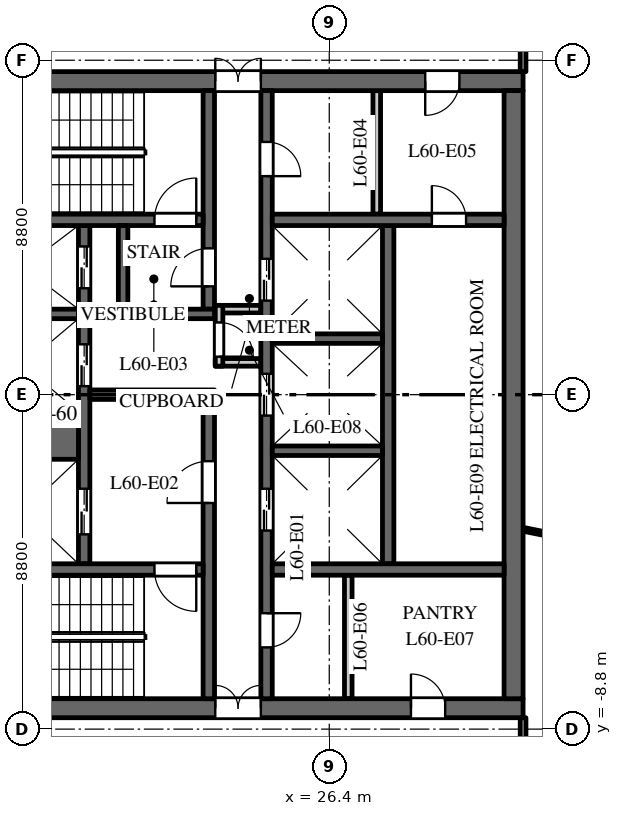
"""IFC4 building model, lengths in metres.
Left out: names, types, materials, properties, quantities, classifications, styles, units other than length and angle.
Written with IfcOpenShell. Run it as: python <this file> out.ifc"""

import sys

from ifc_helpers import new_model, si_unit, direction, frame, frame_2d, origin, place, context, subcontext, project, spatial, rectangle, extrude, element, fill, save


model = new_model("IFC4")
c1 = context("Model", 3, precision=1e-05, world=origin(), true_north=direction((0.0, 1.0)))
c2 = subcontext(c1, "Body", "Model", "MODEL_VIEW")
j1 = project(units=[si_unit("LENGTHUNIT", "METRE"), si_unit("PLANEANGLEUNIT", "RADIAN")], contexts=[c1])
p1 = place(None, origin())
s1 = spatial("IfcSite", under=j1, at=p1, CompositionType="ELEMENT")
p2 = place(p1, origin())
s2 = spatial("IfcBuilding", under=s1, at=p2, CompositionType="ELEMENT")
p3 = place(p2, frame((0.0, 0.0, 281.5)))
s3 = spatial("IfcBuildingStorey", under=s2, at=p3, CompositionType="ELEMENT", Elevation=281.5)
p4 = place(p3, frame((16.5, 8.25, 0.0), z_axis=(0.0, 0.0, 1.0), x_axis=(1.0, 0.0, 0.0)))
e1 = element("IfcWall", 1, at=p4, inside=s3, PredefinedType="SHEAR", context=c2, shape_type="SweptSolid", body=[
    extrude(rectangle(XDim=15.0, YDim=0.5, at=frame_2d((7.5, 0.0))), origin(), (0.0, 0.0, 1.0), 3.7),
])
p5 = place(p4, frame((6.9, 0.0, 0.0)))
e2 = element("IfcOpeningElement", 2, at=p5, cuts=e1, PredefinedType="OPENING", context=c2, shape_type="SweptSolid", body=[
    extrude(rectangle(XDim=1.2, YDim=2.1, at=frame_2d((0.6, 1.05))), frame((0.0, 0.26, 0.0), z_axis=(0.0, -1.0, 0.0), x_axis=(1.0, 0.0, 0.0)), (0.0, 0.0, 1.0), 0.52),
])
p6 = place(p4, frame((12.425, 0.0, 0.0)))
e3 = element("IfcOpeningElement", 3, at=p6, cuts=e1, PredefinedType="OPENING", context=c2, shape_type="SweptSolid", body=[
    extrude(rectangle(XDim=0.9, YDim=2.1, at=frame_2d((0.45, 1.05))), frame((0.0, 0.26, 0.0), z_axis=(0.0, -1.0, 0.0), x_axis=(1.0, 0.0, 0.0)), (0.0, 0.0, 1.0), 0.52),
])
p7 = place(p3, frame((16.5, -8.25, 0.0), z_axis=(0.0, 0.0, 1.0), x_axis=(1.0, 0.0, 0.0)))
e4 = element("IfcWall", 4, at=p7, inside=s3, PredefinedType="SHEAR", context=c2, shape_type="SweptSolid", body=[
    extrude(rectangle(XDim=15.0, YDim=0.5, at=frame_2d((7.5, 0.0))), origin(), (0.0, 0.0, 1.0), 3.7),
])
p8 = place(p7, frame((6.9, 0.0, 0.0)))
e5 = element("IfcOpeningElement", 5, at=p8, cuts=e4, PredefinedType="OPENING", context=c2, shape_type="SweptSolid", body=[
    extrude(rectangle(XDim=1.2, YDim=2.1, at=frame_2d((0.6, 1.05))), frame((0.0, 0.26, 0.0), z_axis=(0.0, -1.0, 0.0), x_axis=(1.0, 0.0, 0.0)), (0.0, 0.0, 1.0), 0.52),
])
p9 = place(p7, frame((12.05, 0.0, 0.0)))
e6 = element("IfcOpeningElement", 6, at=p9, cuts=e4, PredefinedType="OPENING", context=c2, shape_type="SweptSolid", body=[
    extrude(rectangle(XDim=0.9, YDim=2.1, at=frame_2d((0.45, 1.05))), frame((0.0, 0.26, 0.0), z_axis=(0.0, -1.0, 0.0), x_axis=(1.0, 0.0, 0.0)), (0.0, 0.0, 1.0), 0.52),
])
p10 = place(p3, frame((27.95, -4.45, 0.0), z_axis=(0.0, 0.0, 1.0), x_axis=(0.0, 1.0, 0.0)))
e7 = element("IfcWall", 7, at=p10, inside=s3, PredefinedType="SHEAR", context=c2, shape_type="SweptSolid", body=[
    extrude(rectangle(XDim=8.9, YDim=0.3, at=frame_2d((4.45, 0.0))), origin(), (0.0, 0.0, 1.0), 3.7),
])
p11 = place(p3, frame((19.95, -4.45, 0.0), z_axis=(0.0, 0.0, 1.0), x_axis=(0.0, 1.0, 0.0)))
e8 = element("IfcWall", 8, at=p11, inside=s3, PredefinedType="SHEAR", context=c2, shape_type="SweptSolid", body=[
    extrude(rectangle(XDim=8.9, YDim=0.3, at=frame_2d((4.45, 0.0))), origin(), (0.0, 0.0, 1.0), 3.7),
])
p12 = place(p11, frame((0.775, 0.0, 0.0)))
e9 = element("IfcOpeningElement", 9, at=p12, cuts=e8, PredefinedType="OPENING", context=c2, shape_type="SweptSolid", body=[
    extrude(rectangle(XDim=1.2, YDim=2.1, at=frame_2d((0.6, 1.05))), frame((0.0, 0.16, 0.0), z_axis=(0.0, -1.0, 0.0), x_axis=(1.0, 0.0, 0.0)), (0.0, 0.0, 1.0), 0.32),
])
p13 = place(p11, frame((4.675, 0.0, 0.0)))
e10 = element("IfcOpeningElement", 10, at=p13, cuts=e8, PredefinedType="OPENING", context=c2, shape_type="SweptSolid", body=[
    extrude(rectangle(XDim=1.1, YDim=2.1, at=frame_2d((0.55, 1.05))), frame((0.0, 0.16, 0.0), z_axis=(0.0, -1.0, 0.0), x_axis=(1.0, 0.0, 0.0)), (0.0, 0.0, 1.0), 0.32),
])
p14 = place(p11, frame((7.25, 0.0, 0.0)))
e11 = element("IfcOpeningElement", 11, at=p14, cuts=e8, PredefinedType="OPENING", context=c2, shape_type="SweptSolid", body=[
    extrude(rectangle(XDim=1.1, YDim=2.1, at=frame_2d((0.55, 1.05))), frame((0.0, 0.16, 0.0), z_axis=(0.0, -1.0, 0.0), x_axis=(1.0, 0.0, 0.0)), (0.0, 0.0, 1.0), 0.32),
])
p15 = place(p3, frame((24.75, -8.0, 0.0), z_axis=(0.0, 0.0, 1.0), x_axis=(0.0, 1.0, 0.0)))
e12 = element("IfcWall", 12, at=p15, inside=s3, PredefinedType="SHEAR", context=c2, shape_type="SweptSolid", body=[
    extrude(rectangle(XDim=16.0, YDim=0.3, at=frame_2d((8.0, 0.0))), origin(), (0.0, 0.0, 1.0), 3.7),
])
p16 = place(p15, frame((4.425, 0.0, 0.0)))
e13 = element("IfcOpeningElement", 13, at=p16, cuts=e12, PredefinedType="OPENING", context=c2, shape_type="SweptSolid", body=[
    extrude(rectangle(XDim=1.1, YDim=2.1, at=frame_2d((0.55, 1.05))), frame((0.0, 0.16, 0.0), z_axis=(0.0, -1.0, 0.0), x_axis=(1.0, 0.0, 0.0)), (0.0, 0.0, 1.0), 0.32),
])
p17 = place(p15, frame((7.45, 0.0, 0.0)))
e14 = element("IfcOpeningElement", 14, at=p17, cuts=e12, PredefinedType="OPENING", context=c2, shape_type="SweptSolid", body=[
    extrude(rectangle(XDim=1.1, YDim=2.1, at=frame_2d((0.55, 1.05))), frame((0.0, 0.16, 0.0), z_axis=(0.0, -1.0, 0.0), x_axis=(1.0, 0.0, 0.0)), (0.0, 0.0, 1.0), 0.32),
])
p18 = place(p15, frame((10.475, 0.0, 0.0)))
e15 = element("IfcOpeningElement", 15, at=p18, cuts=e12, PredefinedType="OPENING", context=c2, shape_type="SweptSolid", body=[
    extrude(rectangle(XDim=1.1, YDim=2.1, at=frame_2d((0.55, 1.05))), frame((0.0, 0.16, 0.0), z_axis=(0.0, -1.0, 0.0), x_axis=(1.0, 0.0, 0.0)), (0.0, 0.0, 1.0), 0.32),
])
p19 = place(p15, frame((13.75, 0.0, 0.0)))
e16 = element("IfcOpeningElement", 16, at=p19, cuts=e12, PredefinedType="OPENING", context=c2, shape_type="SweptSolid", body=[
    extrude(rectangle(XDim=0.9, YDim=2.1, at=frame_2d((0.45, 1.05))), frame((0.0, 0.16, 0.0), z_axis=(0.0, -1.0, 0.0), x_axis=(1.0, 0.0, 0.0)), (0.0, 0.0, 1.0), 0.32),
])
p20 = place(p15, frame((1.35, 0.0, 0.0)))
e17 = element("IfcOpeningElement", 17, at=p20, cuts=e12, PredefinedType="OPENING", context=c2, shape_type="SweptSolid", body=[
    extrude(rectangle(XDim=0.9, YDim=2.1, at=frame_2d((0.45, 1.05))), frame((0.0, 0.16, 0.0), z_axis=(0.0, -1.0, 0.0), x_axis=(1.0, 0.0, 0.0)), (0.0, 0.0, 1.0), 0.32),
])
p21 = place(p3, frame((20.1, 0.0, 0.0), z_axis=(0.0, 0.0, 1.0), x_axis=(1.0, 0.0, 0.0)))
e18 = element("IfcWall", 18, at=p21, inside=s3, PredefinedType="SHEAR", context=c2, shape_type="SweptSolid", body=[
    extrude(rectangle(XDim=3.28, YDim=0.25, at=frame_2d((1.64, 0.0))), origin(), (0.0, 0.0, 1.0), 3.7),
])
for number, where, z_axis, x_axis in (
    (19, (23.4, 0.85, 0.0), (0.0, 0.0, 1.0), (1.0, 0.0, 0.0)),
    (20, (23.4, 2.25, 0.0), (0.0, 0.0, 1.0), (1.0, 0.0, 0.0)),
):
    element("IfcWall", number, at=place(p3, frame(where, z_axis=z_axis, x_axis=x_axis)), inside=s3, PredefinedType="PARTITIONING", context=c2, shape_type="SweptSolid", body=[
        extrude(rectangle(XDim=1.2, YDim=0.2, at=frame_2d((0.6, 0.0))), origin(), (0.0, 0.0, 1.0), 3.7),
    ])
p22 = place(p3, frame((23.5, 0.75, 0.0), z_axis=(0.0, 0.0, 1.0), x_axis=(0.0, 1.0, 0.0)))
e21 = element("IfcWall", 21, at=p22, inside=s3, PredefinedType="PARTITIONING", context=c2, shape_type="SweptSolid", body=[
    extrude(rectangle(XDim=1.6, YDim=0.2, at=frame_2d((0.8, 0.0))), origin(), (0.0, 0.0, 1.0), 3.7),
])
p23 = place(p22, frame((0.25, 0.0, 0.0)))
e22 = element("IfcOpeningElement", 22, at=p23, cuts=e21, PredefinedType="OPENING", context=c2, shape_type="SweptSolid", body=[
    extrude(rectangle(XDim=0.9, YDim=2.1, at=frame_2d((0.45, 1.05))), frame((0.0, 0.11, 0.0), z_axis=(0.0, -1.0, 0.0), x_axis=(1.0, 0.0, 0.0)), (0.0, 0.0, 1.0), 0.22),
])
p24 = place(p3, frame((31.25, -8.0, 0.0), z_axis=(0.0, 0.0, 1.0), x_axis=(0.0, 1.0, 0.0)))
e23 = element("IfcWall", 23, at=p24, inside=s3, PredefinedType="SHEAR", context=c2, shape_type="SweptSolid", body=[
    extrude(rectangle(XDim=16.0, YDim=0.5, at=frame_2d((8.0, 0.0))), origin(), (0.0, 0.0, 1.0), 3.7),
])
p25 = place(p3, frame((24.9, 4.6, 0.0), z_axis=(0.0, 0.0, 1.0), x_axis=(1.0, 0.0, 0.0)))
e24 = element("IfcWall", 24, at=p25, inside=s3, PredefinedType="SHEAR", context=c2, shape_type="SweptSolid", body=[
    extrude(rectangle(XDim=6.1, YDim=0.3, at=frame_2d((3.05, 0.0))), origin(), (0.0, 0.0, 1.0), 3.7),
])
p26 = place(p25, frame((4.2, 0.0, 0.0)))
e25 = element("IfcOpeningElement", 25, at=p26, cuts=e24, PredefinedType="OPENING", context=c2, shape_type="SweptSolid", body=[
    extrude(rectangle(XDim=0.9, YDim=2.1, at=frame_2d((0.45, 1.05))), frame((0.0, 0.16, 0.0), z_axis=(0.0, -1.0, 0.0), x_axis=(1.0, 0.0, 0.0)), (0.0, 0.0, 1.0), 0.32),
])
for number, where, z_axis, x_axis in (
    (26, (27.65, 4.75, 0.0), (0.0, 0.0, 1.0), (0.0, 1.0, 0.0)),
    (27, (26.9, -8.0, 0.0), (0.0, 0.0, 1.0), (0.0, 1.0, 0.0)),
):
    element("IfcWall", number, at=place(p3, frame(where, z_axis=z_axis, x_axis=x_axis)), inside=s3, PredefinedType="PARTITIONING", context=c2, shape_type="SweptSolid", body=[
        extrude(rectangle(XDim=3.25, YDim=0.2, at=frame_2d((1.625, 0.0))), origin(), (0.0, 0.0, 1.0), 3.7),
    ])
p27 = place(p3, frame((24.9, -4.6, 0.0), z_axis=(0.0, 0.0, 1.0), x_axis=(1.0, 0.0, 0.0)))
e28 = element("IfcWall", 28, at=p27, inside=s3, PredefinedType="SHEAR", context=c2, shape_type="SweptSolid", body=[
    extrude(rectangle(XDim=6.1, YDim=0.3, at=frame_2d((3.05, 0.0))), origin(), (0.0, 0.0, 1.0), 3.7),
])
p28 = place(p3, frame((16.9, -1.075, 0.0), z_axis=(0.0, 0.0, 1.0), x_axis=(1.0, 0.0, 0.0)))
e29 = element("IfcWall", 29, at=p28, inside=s3, PredefinedType="SHEAR", context=c2, shape_type="SweptSolid", body=[
    extrude(rectangle(XDim=2.9, YDim=1.25, at=frame_2d((1.45, 0.0))), origin(), (0.0, 0.0, 1.0), 3.7),
])
for number, where, z_axis, x_axis in (
    (30, (16.9, 2.125, 0.0), (0.0, 0.0, 1.0), (1.0, 0.0, 0.0)),
    (31, (24.9, -1.475, 0.0), (0.0, 0.0, 1.0), (1.0, 0.0, 0.0)),
    (32, (24.9, 1.475, 0.0), (0.0, 0.0, 1.0), (1.0, 0.0, 0.0)),
):
    element("IfcWall", number, at=place(p3, frame(where, z_axis=z_axis, x_axis=x_axis)), inside=s3, PredefinedType="SHEAR", context=c2, shape_type="SweptSolid", body=[
        extrude(rectangle(XDim=2.9, YDim=0.25, at=frame_2d((1.45, 0.0))), origin(), (0.0, 0.0, 1.0), 3.7),
    ])
p29 = place(p3, frame((23.23, 2.25, 0.0), z_axis=(0.0, 0.0, 1.0), x_axis=(0.0, 1.0, 0.0)))
e33 = element("IfcWall", 33, at=p29, inside=s3, PredefinedType="SHEAR", context=c2, shape_type="SweptSolid", body=[
    extrude(rectangle(XDim=5.75, YDim=0.3, at=frame_2d((2.875, 0.0))), origin(), (0.0, 0.0, 1.0), 3.7),
])
p30 = place(p29, frame((0.6, 0.0, 0.0)))
e34 = element("IfcOpeningElement", 34, at=p30, cuts=e33, PredefinedType="OPENING", context=c2, shape_type="SweptSolid", body=[
    extrude(rectangle(XDim=1.0, YDim=2.1, at=frame_2d((0.5, 1.05))), frame((0.0, 0.16, 0.0), z_axis=(0.0, -1.0, 0.0), x_axis=(1.0, 0.0, 0.0)), (0.0, 0.0, 1.0), 0.32),
])
p31 = place(p3, frame((23.23, -8.0, 0.0), z_axis=(0.0, 0.0, 1.0), x_axis=(0.0, 1.0, 0.0)))
e35 = element("IfcWall", 35, at=p31, inside=s3, PredefinedType="SHEAR", context=c2, shape_type="SweptSolid", body=[
    extrude(rectangle(XDim=7.875, YDim=0.3, at=frame_2d((3.938, 0.0))), origin(), (0.0, 0.0, 1.0), 3.7),
])
p32 = place(p31, frame((5.15, 0.0, 0.0)))
e36 = element("IfcOpeningElement", 36, at=p32, cuts=e35, PredefinedType="OPENING", context=c2, shape_type="SweptSolid", body=[
    extrude(rectangle(XDim=1.1, YDim=2.1, at=frame_2d((0.55, 1.05))), frame((0.0, 0.16, 0.0), z_axis=(0.0, -1.0, 0.0), x_axis=(1.0, 0.0, 0.0)), (0.0, 0.0, 1.0), 0.32),
])
p33 = place(p3, frame((16.9, 4.6, 0.0), z_axis=(0.0, 0.0, 1.0), x_axis=(1.0, 0.0, 0.0)))
e37 = element("IfcWall", 37, at=p33, inside=s3, PredefinedType="SHEAR", context=c2, shape_type="SweptSolid", body=[
    extrude(rectangle(XDim=6.18, YDim=0.3, at=frame_2d((3.09, 0.0))), origin(), (0.0, 0.0, 1.0), 3.7),
])
p34 = place(p33, frame((4.9, 0.0, 0.0)))
e38 = element("IfcOpeningElement", 38, at=p34, cuts=e37, PredefinedType="OPENING", context=c2, shape_type="SweptSolid", body=[
    extrude(rectangle(XDim=1.1, YDim=2.1, at=frame_2d((0.55, 1.05))), frame((0.0, 0.16, 0.0), z_axis=(0.0, -1.0, 0.0), x_axis=(1.0, 0.0, 0.0)), (0.0, 0.0, 1.0), 0.32),
])
p35 = place(p3, frame((16.9, -4.6, 0.0), z_axis=(0.0, 0.0, 1.0), x_axis=(1.0, 0.0, 0.0)))
e39 = element("IfcWall", 39, at=p35, inside=s3, PredefinedType="SHEAR", context=c2, shape_type="SweptSolid", body=[
    extrude(rectangle(XDim=6.18, YDim=0.3, at=frame_2d((3.09, 0.0))), origin(), (0.0, 0.0, 1.0), 3.7),
])
p36 = place(p35, frame((4.9, 0.0, 0.0)))
e40 = element("IfcOpeningElement", 40, at=p36, cuts=e39, PredefinedType="OPENING", context=c2, shape_type="SweptSolid", body=[
    extrude(rectangle(XDim=1.1, YDim=2.1, at=frame_2d((0.55, 1.05))), frame((0.0, 0.16, 0.0), z_axis=(0.0, -1.0, 0.0), x_axis=(1.0, 0.0, 0.0)), (0.0, 0.0, 1.0), 0.32),
])
p37 = place(p3, frame((20.85, 2.125, 0.0), z_axis=(0.0, 0.0, 1.0), x_axis=(1.0, 0.0, 0.0)))
e41 = element("IfcWall", 41, at=p37, inside=s3, PredefinedType="SHEAR", context=c2, shape_type="SweptSolid", body=[
    extrude(rectangle(XDim=2.53, YDim=0.25, at=frame_2d((1.265, 0.0))), origin(), (0.0, 0.0, 1.0), 3.7),
])
p38 = place(p3, frame((20.975, 2.25, 0.0), z_axis=(0.0, 0.0, 1.0), x_axis=(0.0, 1.0, 0.0)))
e42 = element("IfcWall", 42, at=p38, inside=s3, PredefinedType="SHEAR", context=c2, shape_type="SweptSolid", body=[
    extrude(rectangle(XDim=2.2, YDim=0.25, at=frame_2d((1.1, 0.0))), origin(), (0.0, 0.0, 1.0), 3.7),
])
p39 = place(p3, frame((31.5, -10.7, 0.0), z_axis=(0.0, 0.0, 1.0), x_axis=(0.0, 1.0, 0.0)))
e43 = element("IfcWall", 43, at=p39, inside=s3, PredefinedType="PARTITIONING", context=c2, shape_type="SweptSolid", body=[
    extrude(rectangle(XDim=2.2, YDim=0.15, at=frame_2d((1.1, 0.0))), origin(), (0.0, 0.0, 1.0), 3.0),
])
p40 = place(p3, frame((31.5, -3.542, 0.0), z_axis=(0.0, 0.0, 1.0), x_axis=(0.980357474535, -0.197228857227, 0.0)))
e44 = element("IfcWall", 44, at=p40, inside=s3, PredefinedType="PARTITIONING", context=c2, shape_type="SweptSolid", body=[
    extrude(rectangle(XDim=4.092, YDim=0.1, at=frame_2d((2.046, 0.0))), origin(), (0.0, 0.0, 1.0), 3.0),
])
p41 = place(p3, frame((31.5, 8.5, 0.0), z_axis=(0.0, 0.0, 1.0), x_axis=(0.0, 1.0, 0.0)))
e45 = element("IfcWall", 45, at=p41, inside=s3, PredefinedType="PARTITIONING", context=c2, shape_type="SweptSolid", body=[
    extrude(rectangle(XDim=2.2, YDim=0.15, at=frame_2d((1.1, 0.0))), origin(), (0.0, 0.0, 1.0), 3.0),
])
p42 = place(p12, origin())
e46 = element("IfcDoor", 46, at=p42, inside=s3, OperationType="DOUBLE_DOOR_SLIDING", PredefinedType="DOOR", context=c2, shape_type="SweptSolid", body=[
    extrude(rectangle(XDim=1.2, YDim=2.1, at=frame_2d((0.6, 1.05))), frame((0.0, 0.025, 0.0), z_axis=(0.0, -1.0, 0.0), x_axis=(1.0, 0.0, 0.0)), (0.0, 0.0, 1.0), 0.05),
])
fill(e9, e46)
p43 = place(p13, origin())
e47 = element("IfcDoor", 47, at=p43, inside=s3, OperationType="DOUBLE_DOOR_SLIDING", PredefinedType="DOOR", context=c2, shape_type="SweptSolid", body=[
    extrude(rectangle(XDim=1.1, YDim=2.1, at=frame_2d((0.55, 1.05))), frame((0.0, 0.025, 0.0), z_axis=(0.0, -1.0, 0.0), x_axis=(1.0, 0.0, 0.0)), (0.0, 0.0, 1.0), 0.05),
])
fill(e10, e47)
p44 = place(p14, origin())
e48 = element("IfcDoor", 48, at=p44, inside=s3, OperationType="DOUBLE_DOOR_SLIDING", PredefinedType="DOOR", context=c2, shape_type="SweptSolid", body=[
    extrude(rectangle(XDim=1.1, YDim=2.1, at=frame_2d((0.55, 1.05))), frame((0.0, 0.025, 0.0), z_axis=(0.0, -1.0, 0.0), x_axis=(1.0, 0.0, 0.0)), (0.0, 0.0, 1.0), 0.05),
])
fill(e11, e48)
p45 = place(p16, origin())
e49 = element("IfcDoor", 49, at=p45, inside=s3, OperationType="DOUBLE_DOOR_SLIDING", PredefinedType="DOOR", context=c2, shape_type="SweptSolid", body=[
    extrude(rectangle(XDim=1.1, YDim=2.1, at=frame_2d((0.55, 1.05))), frame((0.0, 0.025, 0.0), z_axis=(0.0, -1.0, 0.0), x_axis=(1.0, 0.0, 0.0)), (0.0, 0.0, 1.0), 0.05),
])
fill(e13, e49)
p46 = place(p17, origin())
e50 = element("IfcDoor", 50, at=p46, inside=s3, OperationType="DOUBLE_DOOR_SLIDING", PredefinedType="DOOR", context=c2, shape_type="SweptSolid", body=[
    extrude(rectangle(XDim=1.1, YDim=2.1, at=frame_2d((0.55, 1.05))), frame((0.0, 0.025, 0.0), z_axis=(0.0, -1.0, 0.0), x_axis=(1.0, 0.0, 0.0)), (0.0, 0.0, 1.0), 0.05),
])
fill(e14, e50)
p47 = place(p18, origin())
e51 = element("IfcDoor", 51, at=p47, inside=s3, OperationType="DOUBLE_DOOR_SLIDING", PredefinedType="DOOR", context=c2, shape_type="SweptSolid", body=[
    extrude(rectangle(XDim=1.1, YDim=2.1, at=frame_2d((0.55, 1.05))), frame((0.0, 0.025, 0.0), z_axis=(0.0, -1.0, 0.0), x_axis=(1.0, 0.0, 0.0)), (0.0, 0.0, 1.0), 0.05),
])
fill(e15, e51)
p48 = place(p34, origin())
e52 = element("IfcDoor", 52, at=p48, inside=s3, OperationType="SINGLE_SWING_LEFT", PredefinedType="DOOR", context=c2, shape_type="SweptSolid", body=[
    extrude(rectangle(XDim=1.1, YDim=2.1, at=frame_2d((0.55, 1.05))), frame((0.0, 0.025, 0.0), z_axis=(0.0, -1.0, 0.0), x_axis=(1.0, 0.0, 0.0)), (0.0, 0.0, 1.0), 0.05),
])
fill(e38, e52)
p49 = place(p36, origin())
e53 = element("IfcDoor", 53, at=p49, inside=s3, OperationType="SINGLE_SWING_RIGHT", PredefinedType="DOOR", context=c2, shape_type="SweptSolid", body=[
    extrude(rectangle(XDim=1.1, YDim=2.1, at=frame_2d((0.55, 1.05))), frame((0.0, 0.025, 0.0), z_axis=(0.0, -1.0, 0.0), x_axis=(1.0, 0.0, 0.0)), (0.0, 0.0, 1.0), 0.05),
])
fill(e40, e53)
p50 = place(p32, origin())
e54 = element("IfcDoor", 54, at=p50, inside=s3, OperationType="SINGLE_SWING_RIGHT", PredefinedType="DOOR", context=c2, shape_type="SweptSolid", body=[
    extrude(rectangle(XDim=1.1, YDim=2.1, at=frame_2d((0.55, 1.05))), frame((0.0, 0.025, 0.0), z_axis=(0.0, -1.0, 0.0), x_axis=(1.0, 0.0, 0.0)), (0.0, 0.0, 1.0), 0.05),
])
fill(e36, e54)
p51 = place(p30, origin())
e55 = element("IfcDoor", 55, at=p51, inside=s3, OperationType="SINGLE_SWING_RIGHT", PredefinedType="DOOR", context=c2, shape_type="SweptSolid", body=[
    extrude(rectangle(XDim=1.0, YDim=2.1, at=frame_2d((0.5, 1.05))), frame((0.0, 0.025, 0.0), z_axis=(0.0, -1.0, 0.0), x_axis=(1.0, 0.0, 0.0)), (0.0, 0.0, 1.0), 0.05),
])
fill(e34, e55)
p52 = place(p5, origin())
e56 = element("IfcDoor", 56, at=p52, inside=s3, OperationType="DOUBLE_DOOR_DOUBLE_SWING", PredefinedType="DOOR", context=c2, shape_type="SweptSolid", body=[
    extrude(rectangle(XDim=1.2, YDim=2.1, at=frame_2d((0.6, 1.05))), frame((0.0, 0.025, 0.0), z_axis=(0.0, -1.0, 0.0), x_axis=(1.0, 0.0, 0.0)), (0.0, 0.0, 1.0), 0.05),
])
fill(e2, e56)
p53 = place(p8, origin())
e57 = element("IfcDoor", 57, at=p53, inside=s3, OperationType="DOUBLE_DOOR_DOUBLE_SWING", PredefinedType="DOOR", context=c2, shape_type="SweptSolid", body=[
    extrude(rectangle(XDim=1.2, YDim=2.1, at=frame_2d((0.6, 1.05))), frame((0.0, 0.025, 0.0), z_axis=(0.0, -1.0, 0.0), x_axis=(1.0, 0.0, 0.0)), (0.0, 0.0, 1.0), 0.05),
])
fill(e5, e57)
p54 = place(p19, origin())
e58 = element("IfcDoor", 58, at=p54, inside=s3, OperationType="SINGLE_SWING_LEFT", PredefinedType="DOOR", context=c2, shape_type="SweptSolid", body=[
    extrude(rectangle(XDim=0.9, YDim=2.1, at=frame_2d((0.45, 1.05))), frame((0.0, 0.025, 0.0), z_axis=(0.0, -1.0, 0.0), x_axis=(1.0, 0.0, 0.0)), (0.0, 0.0, 1.0), 0.05),
])
fill(e16, e58)
p55 = place(p6, origin())
e59 = element("IfcDoor", 59, at=p55, inside=s3, OperationType="SINGLE_SWING_LEFT", PredefinedType="DOOR", context=c2, shape_type="SweptSolid", body=[
    extrude(rectangle(XDim=0.9, YDim=2.1, at=frame_2d((0.45, 1.05))), frame((0.0, 0.025, 0.0), z_axis=(0.0, -1.0, 0.0), x_axis=(1.0, 0.0, 0.0)), (0.0, 0.0, 1.0), 0.05),
])
fill(e3, e59)
p56 = place(p20, origin())
e60 = element("IfcDoor", 60, at=p56, inside=s3, OperationType="SINGLE_SWING_RIGHT", PredefinedType="DOOR", context=c2, shape_type="SweptSolid", body=[
    extrude(rectangle(XDim=0.9, YDim=2.1, at=frame_2d((0.45, 1.05))), frame((0.0, 0.025, 0.0), z_axis=(0.0, -1.0, 0.0), x_axis=(1.0, 0.0, 0.0)), (0.0, 0.0, 1.0), 0.05),
])
fill(e17, e60)
p57 = place(p9, origin())
e61 = element("IfcDoor", 61, at=p57, inside=s3, OperationType="SINGLE_SWING_RIGHT", PredefinedType="DOOR", context=c2, shape_type="SweptSolid", body=[
    extrude(rectangle(XDim=0.9, YDim=2.1, at=frame_2d((0.45, 1.05))), frame((0.0, 0.025, 0.0), z_axis=(0.0, -1.0, 0.0), x_axis=(1.0, 0.0, 0.0)), (0.0, 0.0, 1.0), 0.05),
])
fill(e6, e61)
p58 = place(p23, origin())
e62 = element("IfcDoor", 62, at=p58, inside=s3, OperationType="SINGLE_SWING_LEFT", PredefinedType="DOOR", context=c2, shape_type="SweptSolid", body=[
    extrude(rectangle(XDim=0.9, YDim=2.1, at=frame_2d((0.45, 1.05))), frame((0.0, 0.025, 0.0), z_axis=(0.0, -1.0, 0.0), x_axis=(1.0, 0.0, 0.0)), (0.0, 0.0, 1.0), 0.05),
])
fill(e22, e62)
p59 = place(p26, origin())
e63 = element("IfcDoor", 63, at=p59, inside=s3, OperationType="SINGLE_SWING_RIGHT", PredefinedType="DOOR", context=c2, shape_type="SweptSolid", body=[
    extrude(rectangle(XDim=0.9, YDim=2.1, at=frame_2d((0.45, 1.05))), frame((0.0, 0.025, 0.0), z_axis=(0.0, -1.0, 0.0), x_axis=(1.0, 0.0, 0.0)), (0.0, 0.0, 1.0), 0.05),
])
fill(e25, e63)
save(model, sys.argv[1])
